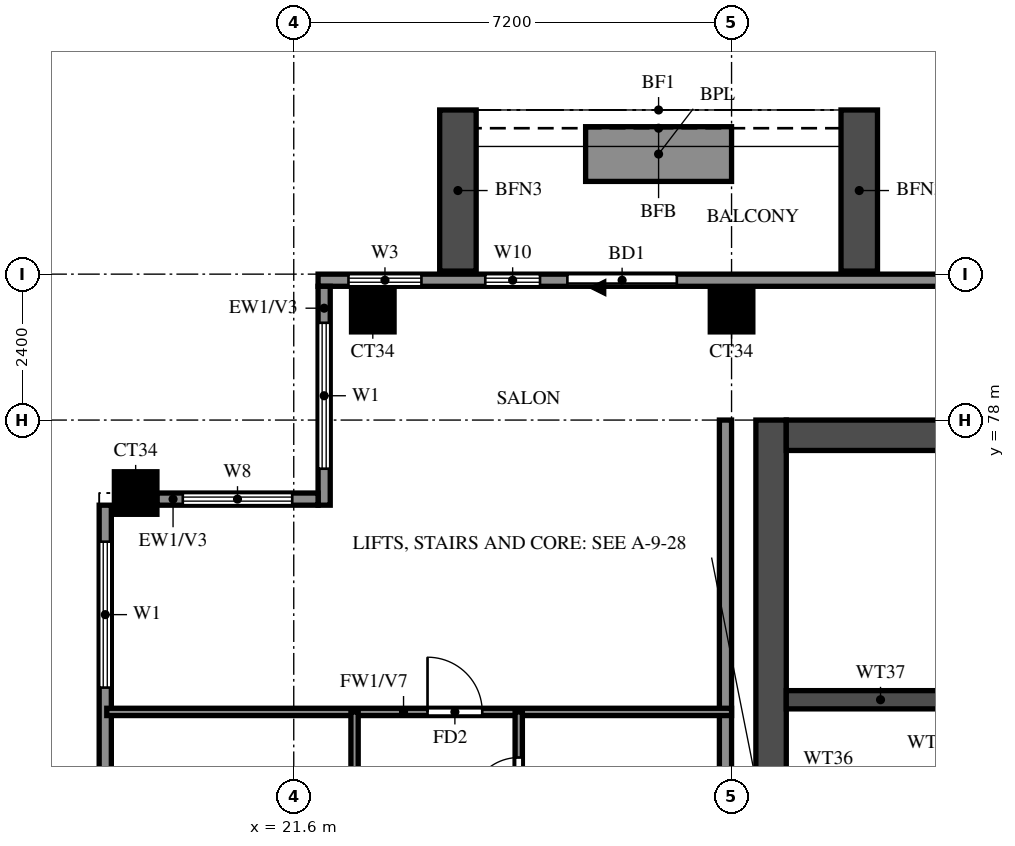
"""IFC4 building model, lengths in metres.
Left out: names, types, materials, properties, quantities, classifications, styles, units other than length and angle.
Written with IfcOpenShell. Run it as: python <this file> out.ifc"""

import sys

from ifc_helpers import new_model, si_unit, direction, frame, frame_2d, origin, origin_2d, place, context, subcontext, project, spatial, rectangle, extrude, source, transform, mapped, element, fill, save


model = new_model("IFC4")
c1 = context("Model", 3, precision=1e-05, world=origin(), true_north=direction((0.0, 1.0)))
c2 = subcontext(c1, "Body", "Model", "MODEL_VIEW")
j1 = project(units=[si_unit("LENGTHUNIT", "METRE"), si_unit("PLANEANGLEUNIT", "RADIAN")], contexts=[c1])
p1 = place(None, origin())
s1 = spatial("IfcSite", under=j1, at=p1, CompositionType="ELEMENT")
p2 = place(p1, origin())
s2 = spatial("IfcBuilding", under=s1, at=p2, CompositionType="ELEMENT")
p3 = place(p2, frame((0.0, 0.0, 218.5)))
s3 = spatial("IfcBuildingStorey", under=s2, at=p3, CompositionType="ELEMENT", Elevation=218.5)
m1 = source(origin(), c2, "Body", "SweptSolid", [
    extrude(rectangle(XDim=0.7, YDim=0.7, at=origin_2d()), origin(), (0.0, 0.0, 1.0), 3.22),
])
for number, where, z_axis, x_axis in (
    (1, (19.0, 76.8, 0.0), (0.0, 0.0, 1.0), (1.0, 0.0, 0.0)),
    (2, (22.9, 79.8, 0.0), (0.0, 0.0, 1.0), (1.0, 0.0, 0.0)),
    (3, (28.8, 79.8, 0.0), (0.0, 0.0, 1.0), (1.0, 0.0, 0.0)),
):
    element("IfcColumn", number, at=place(p3, frame(where, z_axis=z_axis, x_axis=x_axis)), inside=s3, PredefinedType="COLUMN", context=c2, shape_type="MappedRepresentation", body=[
        mapped(m1, transform((0.0, 0.0, 0.0))),
    ])
p4 = place(p3, frame((29.45, 66.15, 0.0), z_axis=(0.0, 0.0, 1.0), x_axis=(0.0, 1.0, 0.0)))
e4 = element("IfcWall", 4, at=p4, inside=s3, PredefinedType="SHEAR", context=c2, shape_type="SweptSolid", body=[
    extrude(rectangle(XDim=11.85, YDim=0.5, at=frame_2d((5.925, 0.0))), origin(), (0.0, 0.0, 1.0), 3.22),
])
p5 = place(p3, frame((29.7, 77.75, 0.0), z_axis=(0.0, 0.0, 1.0), x_axis=(1.0, 0.0, 0.0)))
e5 = element("IfcWall", 5, at=p5, inside=s3, PredefinedType="SHEAR", context=c2, shape_type="SweptSolid", body=[
    extrude(rectangle(XDim=41.4, YDim=0.5, at=frame_2d((20.7, 0.0))), origin(), (0.0, 0.0, 1.0), 3.22),
])
p6 = place(p3, frame((29.7, 73.4, 0.0), z_axis=(0.0, 0.0, 1.0), x_axis=(1.0, 0.0, 0.0)))
e6 = element("IfcWall", 6, at=p6, inside=s3, PredefinedType="SHEAR", context=c2, shape_type="SweptSolid", body=[
    extrude(rectangle(XDim=3.1, YDim=0.3, at=frame_2d((1.55, 0.0))), origin(), (0.0, 0.0, 1.0), 3.22),
])
p7 = place(p3, frame((78.6, 80.3, 0.0), z_axis=(0.0, 0.0, 1.0), x_axis=(-1.0, 0.0, 0.0)))
e7 = element("IfcWall", 7, at=p7, inside=s3, PredefinedType="SOLIDWALL", context=c2, shape_type="SweptSolid", body=[
    extrude(rectangle(XDim=56.6, YDim=0.2, at=frame_2d((28.3, 0.0))), origin(), (0.0, 0.0, 1.0), 3.22),
])
p8 = place(p7, frame((50.7, 0.0, 0.0)))
e8 = element("IfcOpeningElement", 8, at=p8, cuts=e7, PredefinedType="OPENING", context=c2, shape_type="SweptSolid", body=[
    extrude(rectangle(XDim=1.8, YDim=2.4, at=frame_2d((0.9, 1.2))), frame((0.0, 0.11, 0.0), z_axis=(0.0, -1.0, 0.0), x_axis=(1.0, 0.0, 0.0)), (0.0, 0.0, 1.0), 0.22),
])
p9 = place(p7, frame((52.95, 0.0, 0.6)))
e9 = element("IfcOpeningElement", 9, at=p9, cuts=e7, PredefinedType="OPENING", context=c2, shape_type="SweptSolid", body=[
    extrude(rectangle(XDim=0.9, YDim=2.4, at=frame_2d((0.45, 1.2))), frame((0.0, 0.11, 0.0), z_axis=(0.0, -1.0, 0.0), x_axis=(1.0, 0.0, 0.0)), (0.0, 0.0, 1.0), 0.22),
])
p10 = place(p7, frame((54.9, 0.0, 0.6)))
e10 = element("IfcOpeningElement", 10, at=p10, cuts=e7, PredefinedType="OPENING", context=c2, shape_type="SweptSolid", body=[
    extrude(rectangle(XDim=1.2, YDim=2.4, at=frame_2d((0.6, 1.2))), frame((0.0, 0.11, 0.0), z_axis=(0.0, -1.0, 0.0), x_axis=(1.0, 0.0, 0.0)), (0.0, 0.0, 1.0), 0.22),
])
p11 = place(p7, frame((0.767, 0.0, 0.6)))
e11 = element("IfcOpeningElement", 11, at=p11, cuts=e7, PredefinedType="OPENING", context=c2, shape_type="SweptSolid", body=[
    extrude(rectangle(XDim=2.4, YDim=2.4, at=frame_2d((1.2, 1.2))), frame((0.0, 0.11, 0.0), z_axis=(0.0, -1.0, 0.0), x_axis=(1.0, 0.0, 0.0)), (0.0, 0.0, 1.0), 0.22),
])
p12 = place(p7, frame((3.633, 0.0, 0.6)))
e12 = element("IfcOpeningElement", 12, at=p12, cuts=e7, PredefinedType="OPENING", context=c2, shape_type="SweptSolid", body=[
    extrude(rectangle(XDim=2.4, YDim=2.4, at=frame_2d((1.2, 1.2))), frame((0.0, 0.11, 0.0), z_axis=(0.0, -1.0, 0.0), x_axis=(1.0, 0.0, 0.0)), (0.0, 0.0, 1.0), 0.22),
])
p13 = place(p3, frame((22.1, 80.2, 0.0), z_axis=(0.0, 0.0, 1.0), x_axis=(0.0, -1.0, 0.0)))
e13 = element("IfcWall", 13, at=p13, inside=s3, PredefinedType="SOLIDWALL", context=c2, shape_type="SweptSolid", body=[
    extrude(rectangle(XDim=3.6, YDim=0.2, at=frame_2d((1.8, 0.0))), origin(), (0.0, 0.0, 1.0), 3.22),
])
p14 = place(p13, frame((0.6, 0.0, 0.6)))
e14 = element("IfcOpeningElement", 14, at=p14, cuts=e13, PredefinedType="OPENING", context=c2, shape_type="SweptSolid", body=[
    extrude(rectangle(XDim=2.4, YDim=2.4, at=frame_2d((1.2, 1.2))), frame((0.0, 0.11, 0.0), z_axis=(0.0, -1.0, 0.0), x_axis=(1.0, 0.0, 0.0)), (0.0, 0.0, 1.0), 0.22),
])
p15 = place(p3, frame((22.0, 76.7, 0.0), z_axis=(0.0, 0.0, 1.0), x_axis=(-1.0, 0.0, 0.0)))
e15 = element("IfcWall", 15, at=p15, inside=s3, PredefinedType="SOLIDWALL", context=c2, shape_type="SweptSolid", body=[
    extrude(rectangle(XDim=2.65, YDim=0.2, at=frame_2d((1.325, 0.0))), origin(), (0.0, 0.0, 1.0), 3.22),
])
p16 = place(p15, frame((0.425, 0.0, 0.6)))
e16 = element("IfcOpeningElement", 16, at=p16, cuts=e15, PredefinedType="OPENING", context=c2, shape_type="SweptSolid", body=[
    extrude(rectangle(XDim=1.8, YDim=2.4, at=frame_2d((0.9, 1.2))), frame((0.0, 0.11, 0.0), z_axis=(0.0, -1.0, 0.0), x_axis=(1.0, 0.0, 0.0)), (0.0, 0.0, 1.0), 0.22),
])
p17 = place(p3, frame((18.5, 76.6, 0.0), z_axis=(0.0, 0.0, 1.0), x_axis=(0.0, -1.0, 0.0)))
e17 = element("IfcWall", 17, at=p17, inside=s3, PredefinedType="SOLIDWALL", context=c2, shape_type="SweptSolid", body=[
    extrude(rectangle(XDim=33.4, YDim=0.2, at=frame_2d((16.7, 0.0))), origin(), (0.0, 0.0, 1.0), 3.22),
])
p18 = place(p17, frame((18.7, 0.0, 0.0)))
e18 = element("IfcOpeningElement", 18, at=p18, cuts=e17, PredefinedType="OPENING", context=c2, shape_type="SweptSolid", body=[
    extrude(rectangle(XDim=1.8, YDim=2.4, at=frame_2d((0.9, 1.2))), frame((0.0, 0.11, 0.0), z_axis=(0.0, -1.0, 0.0), x_axis=(1.0, 0.0, 0.0)), (0.0, 0.0, 1.0), 0.22),
])
p19 = place(p17, frame((29.7, 0.0, 0.6)))
e19 = element("IfcOpeningElement", 19, at=p19, cuts=e17, PredefinedType="OPENING", context=c2, shape_type="SweptSolid", body=[
    extrude(rectangle(XDim=2.4, YDim=2.4, at=frame_2d((1.2, 1.2))), frame((0.0, 0.11, 0.0), z_axis=(0.0, -1.0, 0.0), x_axis=(1.0, 0.0, 0.0)), (0.0, 0.0, 1.0), 0.22),
])
p20 = place(p17, frame((25.6, 0.0, 0.6)))
e20 = element("IfcOpeningElement", 20, at=p20, cuts=e17, PredefinedType="OPENING", context=c2, shape_type="SweptSolid", body=[
    extrude(rectangle(XDim=2.4, YDim=2.4, at=frame_2d((1.2, 1.2))), frame((0.0, 0.11, 0.0), z_axis=(0.0, -1.0, 0.0), x_axis=(1.0, 0.0, 0.0)), (0.0, 0.0, 1.0), 0.22),
])
p21 = place(p17, frame((21.7, 0.0, 0.6)))
e21 = element("IfcOpeningElement", 21, at=p21, cuts=e17, PredefinedType="OPENING", context=c2, shape_type="SweptSolid", body=[
    extrude(rectangle(XDim=1.2, YDim=2.4, at=frame_2d((0.6, 1.2))), frame((0.0, 0.11, 0.0), z_axis=(0.0, -1.0, 0.0), x_axis=(1.0, 0.0, 0.0)), (0.0, 0.0, 1.0), 0.22),
])
p22 = place(p17, frame((23.95, 0.0, 0.6)))
e22 = element("IfcOpeningElement", 22, at=p22, cuts=e17, PredefinedType="OPENING", context=c2, shape_type="SweptSolid", body=[
    extrude(rectangle(XDim=0.9, YDim=2.4, at=frame_2d((0.45, 1.2))), frame((0.0, 0.11, 0.0), z_axis=(0.0, -1.0, 0.0), x_axis=(1.0, 0.0, 0.0)), (0.0, 0.0, 1.0), 0.22),
])
p23 = place(p17, frame((14.5, 0.0, 0.6)))
e23 = element("IfcOpeningElement", 23, at=p23, cuts=e17, PredefinedType="OPENING", context=c2, shape_type="SweptSolid", body=[
    extrude(rectangle(XDim=1.8, YDim=2.4, at=frame_2d((0.9, 1.2))), frame((0.0, 0.11, 0.0), z_axis=(0.0, -1.0, 0.0), x_axis=(1.0, 0.0, 0.0)), (0.0, 0.0, 1.0), 0.22),
])
p24 = place(p17, frame((7.833, 0.0, 0.6)))
e24 = element("IfcOpeningElement", 24, at=p24, cuts=e17, PredefinedType="OPENING", context=c2, shape_type="SweptSolid", body=[
    extrude(rectangle(XDim=2.4, YDim=2.4, at=frame_2d((1.2, 1.2))), frame((0.0, 0.11, 0.0), z_axis=(0.0, -1.0, 0.0), x_axis=(1.0, 0.0, 0.0)), (0.0, 0.0, 1.0), 0.22),
])
p25 = place(p17, frame((10.967, 0.0, 0.6)))
e25 = element("IfcOpeningElement", 25, at=p25, cuts=e17, PredefinedType="OPENING", context=c2, shape_type="SweptSolid", body=[
    extrude(rectangle(XDim=2.4, YDim=2.4, at=frame_2d((1.2, 1.2))), frame((0.0, 0.11, 0.0), z_axis=(0.0, -1.0, 0.0), x_axis=(1.0, 0.0, 0.0)), (0.0, 0.0, 1.0), 0.22),
])
p26 = place(p17, frame((4.75, 0.0, 1.5)))
e26 = element("IfcOpeningElement", 26, at=p26, cuts=e17, PredefinedType="OPENING", context=c2, shape_type="SweptSolid", body=[
    extrude(rectangle(XDim=0.9, YDim=0.9, at=frame_2d((0.45, 0.45))), frame((0.0, 0.11, 0.0), z_axis=(0.0, -1.0, 0.0), x_axis=(1.0, 0.0, 0.0)), (0.0, 0.0, 1.0), 0.22),
])
p27 = place(p17, frame((0.6, 0.0, 0.6)))
e27 = element("IfcOpeningElement", 27, at=p27, cuts=e17, PredefinedType="OPENING", context=c2, shape_type="SweptSolid", body=[
    extrude(rectangle(XDim=2.4, YDim=2.4, at=frame_2d((1.2, 1.2))), frame((0.0, 0.11, 0.0), z_axis=(0.0, -1.0, 0.0), x_axis=(1.0, 0.0, 0.0)), (0.0, 0.0, 1.0), 0.22),
])
for number, where, z_axis, x_axis in (
    (28, (30.9, 80.45, 0.0), (0.0, 0.0, 1.0), (0.0, 1.0, 0.0)),
    (29, (24.3, 80.45, 0.0), (0.0, 0.0, 1.0), (0.0, 1.0, 0.0)),
):
    element("IfcWall", number, at=place(p3, frame(where, z_axis=z_axis, x_axis=x_axis)), inside=s3, PredefinedType="SOLIDWALL", context=c2, shape_type="SweptSolid", body=[
        extrude(rectangle(XDim=2.65, YDim=0.6, at=frame_2d((1.325, 0.0))), origin(), (0.0, 0.0, 1.0), 2.85),
    ])
p28 = place(p3, frame((28.8, 82.375, 0.0), z_axis=(0.0, 0.0, 1.0), x_axis=(-1.0, 0.0, 0.0)))
e30 = element("IfcWall", 30, at=p28, inside=s3, PredefinedType="SOLIDWALL", context=c2, shape_type="SweptSolid", body=[
    extrude(rectangle(XDim=2.4, YDim=0.9, at=frame_2d((1.2, 0.0))), origin(), (0.0, 0.0, 1.0), 0.9),
])
p29 = place(p3, frame((28.7, 62.4, 0.0), z_axis=(0.0, 0.0, 1.0), x_axis=(0.0, 1.0, 0.0)))
e31 = element("IfcWall", 31, at=p29, inside=s3, PredefinedType="SOLIDWALL", context=c2, shape_type="SweptSolid", body=[
    extrude(rectangle(XDim=15.6, YDim=0.2, at=frame_2d((7.8, 0.0))), origin(), (0.0, 0.0, 1.0), 3.22),
])
p30 = place(p3, frame((18.525, 73.2, 0.0), z_axis=(0.0, 0.0, 1.0), x_axis=(1.0, 0.0, 0.0)))
e32 = element("IfcWall", 32, at=p30, inside=s3, PredefinedType="PARTITIONING", context=c2, shape_type="SweptSolid", body=[
    extrude(rectangle(XDim=10.275, YDim=0.12, at=frame_2d((5.138, 0.0))), origin(), (0.0, 0.0, 1.0), 2.32),
])
p31 = place(p30, frame((5.275, 0.0, 0.0)))
e33 = element("IfcOpeningElement", 33, at=p31, cuts=e32, PredefinedType="OPENING", context=c2, shape_type="SweptSolid", body=[
    extrude(rectangle(XDim=0.9, YDim=2.1, at=frame_2d((0.45, 1.05))), frame((0.0, 0.07, 0.0), z_axis=(0.0, -1.0, 0.0), x_axis=(1.0, 0.0, 0.0)), (0.0, 0.0, 1.0), 0.14),
])
p32 = place(p3, frame((22.6, 69.6, 0.0), z_axis=(0.0, 0.0, 1.0), x_axis=(0.0, 1.0, 0.0)))
e34 = element("IfcWall", 34, at=p32, inside=s3, PredefinedType="PARTITIONING", context=c2, shape_type="SweptSolid", body=[
    extrude(rectangle(XDim=3.6, YDim=0.12, at=frame_2d((1.8, 0.0))), origin(), (0.0, 0.0, 1.0), 3.22),
])
p33 = place(p3, frame((25.3, 61.2, 0.0), z_axis=(0.0, 0.0, 1.0), x_axis=(0.0, 1.0, 0.0)))
e35 = element("IfcWall", 35, at=p33, inside=s3, PredefinedType="PARTITIONING", context=c2, shape_type="SweptSolid", body=[
    extrude(rectangle(XDim=12.0, YDim=0.12, at=frame_2d((6.0, 0.0))), origin(), (0.0, 0.0, 1.0), 3.22),
])
p34 = place(p33, frame((4.2, 0.0, 0.0)))
e36 = element("IfcOpeningElement", 36, at=p34, cuts=e35, PredefinedType="OPENING", context=c2, shape_type="SweptSolid", body=[
    extrude(rectangle(XDim=0.9, YDim=2.1, at=frame_2d((0.45, 1.05))), frame((0.0, 0.07, 0.0), z_axis=(0.0, -1.0, 0.0), x_axis=(1.0, 0.0, 0.0)), (0.0, 0.0, 1.0), 0.14),
])
p35 = place(p33, frame((7.975, 0.0, 0.0)))
e37 = element("IfcOpeningElement", 37, at=p35, cuts=e35, PredefinedType="OPENING", context=c2, shape_type="SweptSolid", body=[
    extrude(rectangle(XDim=0.8, YDim=2.1, at=frame_2d((0.4, 1.05))), frame((0.0, 0.07, 0.0), z_axis=(0.0, -1.0, 0.0), x_axis=(1.0, 0.0, 0.0)), (0.0, 0.0, 1.0), 0.14),
])
p36 = place(p33, frame((10.45, 0.0, 0.0)))
e38 = element("IfcOpeningElement", 38, at=p36, cuts=e35, PredefinedType="OPENING", context=c2, shape_type="SweptSolid", body=[
    extrude(rectangle(XDim=0.8, YDim=2.1, at=frame_2d((0.4, 1.05))), frame((0.0, 0.07, 0.0), z_axis=(0.0, -1.0, 0.0), x_axis=(1.0, 0.0, 0.0)), (0.0, 0.0, 1.0), 0.14),
])
p37 = place(p8, origin())
e39 = element("IfcDoor", 39, at=p37, inside=s3, OperationType="DOUBLE_DOOR_SLIDING", PredefinedType="DOOR", context=c2, shape_type="SweptSolid", body=[
    extrude(rectangle(XDim=1.8, YDim=2.4, at=frame_2d((0.9, 1.2))), frame((0.0, 0.025, 0.0), z_axis=(0.0, -1.0, 0.0), x_axis=(1.0, 0.0, 0.0)), (0.0, 0.0, 1.0), 0.05),
])
fill(e8, e39)
p38 = place(p9, origin())
e40 = element("IfcWindow", 40, at=p38, inside=s3, PartitioningType="SINGLE_PANEL", PredefinedType="WINDOW", context=c2, shape_type="SweptSolid", body=[
    extrude(rectangle(XDim=0.9, YDim=2.4, at=frame_2d((0.45, 1.2))), frame((0.0, 0.03, 0.0), z_axis=(0.0, -1.0, 0.0), x_axis=(1.0, 0.0, 0.0)), (0.0, 0.0, 1.0), 0.06),
])
fill(e9, e40)
p39 = place(p10, origin())
e41 = element("IfcWindow", 41, at=p39, inside=s3, PartitioningType="SINGLE_PANEL", PredefinedType="WINDOW", context=c2, shape_type="SweptSolid", body=[
    extrude(rectangle(XDim=1.2, YDim=2.4, at=frame_2d((0.6, 1.2))), frame((0.0, 0.03, 0.0), z_axis=(0.0, -1.0, 0.0), x_axis=(1.0, 0.0, 0.0)), (0.0, 0.0, 1.0), 0.06),
])
fill(e10, e41)
p40 = place(p14, origin())
e42 = element("IfcWindow", 42, at=p40, inside=s3, PartitioningType="DOUBLE_PANEL_VERTICAL", PredefinedType="WINDOW", context=c2, shape_type="SweptSolid", body=[
    extrude(rectangle(XDim=2.4, YDim=2.4, at=frame_2d((1.2, 1.2))), frame((0.0, 0.03, 0.0), z_axis=(0.0, -1.0, 0.0), x_axis=(1.0, 0.0, 0.0)), (0.0, 0.0, 1.0), 0.06),
])
fill(e14, e42)
p41 = place(p16, origin())
e43 = element("IfcWindow", 43, at=p41, inside=s3, PartitioningType="DOUBLE_PANEL_VERTICAL", PredefinedType="WINDOW", context=c2, shape_type="SweptSolid", body=[
    extrude(rectangle(XDim=1.8, YDim=2.4, at=frame_2d((0.9, 1.2))), frame((0.0, 0.03, 0.0), z_axis=(0.0, -1.0, 0.0), x_axis=(1.0, 0.0, 0.0)), (0.0, 0.0, 1.0), 0.06),
])
fill(e16, e43)
p42 = place(p27, origin())
e44 = element("IfcWindow", 44, at=p42, inside=s3, PartitioningType="DOUBLE_PANEL_VERTICAL", PredefinedType="WINDOW", context=c2, shape_type="SweptSolid", body=[
    extrude(rectangle(XDim=2.4, YDim=2.4, at=frame_2d((1.2, 1.2))), frame((0.0, 0.03, 0.0), z_axis=(0.0, -1.0, 0.0), x_axis=(1.0, 0.0, 0.0)), (0.0, 0.0, 1.0), 0.06),
])
fill(e27, e44)
p43 = place(p31, origin())
e45 = element("IfcDoor", 45, at=p43, inside=s3, OperationType="SINGLE_SWING_LEFT", PredefinedType="DOOR", context=c2, shape_type="SweptSolid", body=[
    extrude(rectangle(XDim=0.9, YDim=2.1, at=frame_2d((0.45, 1.05))), frame((0.0, 0.025, 0.0), z_axis=(0.0, -1.0, 0.0), x_axis=(1.0, 0.0, 0.0)), (0.0, 0.0, 1.0), 0.05),
])
fill(e33, e45)
p44 = place(p36, origin())
e46 = element("IfcDoor", 46, at=p44, inside=s3, OperationType="SINGLE_SWING_LEFT", PredefinedType="DOOR", context=c2, shape_type="SweptSolid", body=[
    extrude(rectangle(XDim=0.8, YDim=2.1, at=frame_2d((0.4, 1.05))), frame((0.0, 0.025, 0.0), z_axis=(0.0, -1.0, 0.0), x_axis=(1.0, 0.0, 0.0)), (0.0, 0.0, 1.0), 0.05),
])
fill(e38, e46)
save(model, sys.argv[1])
